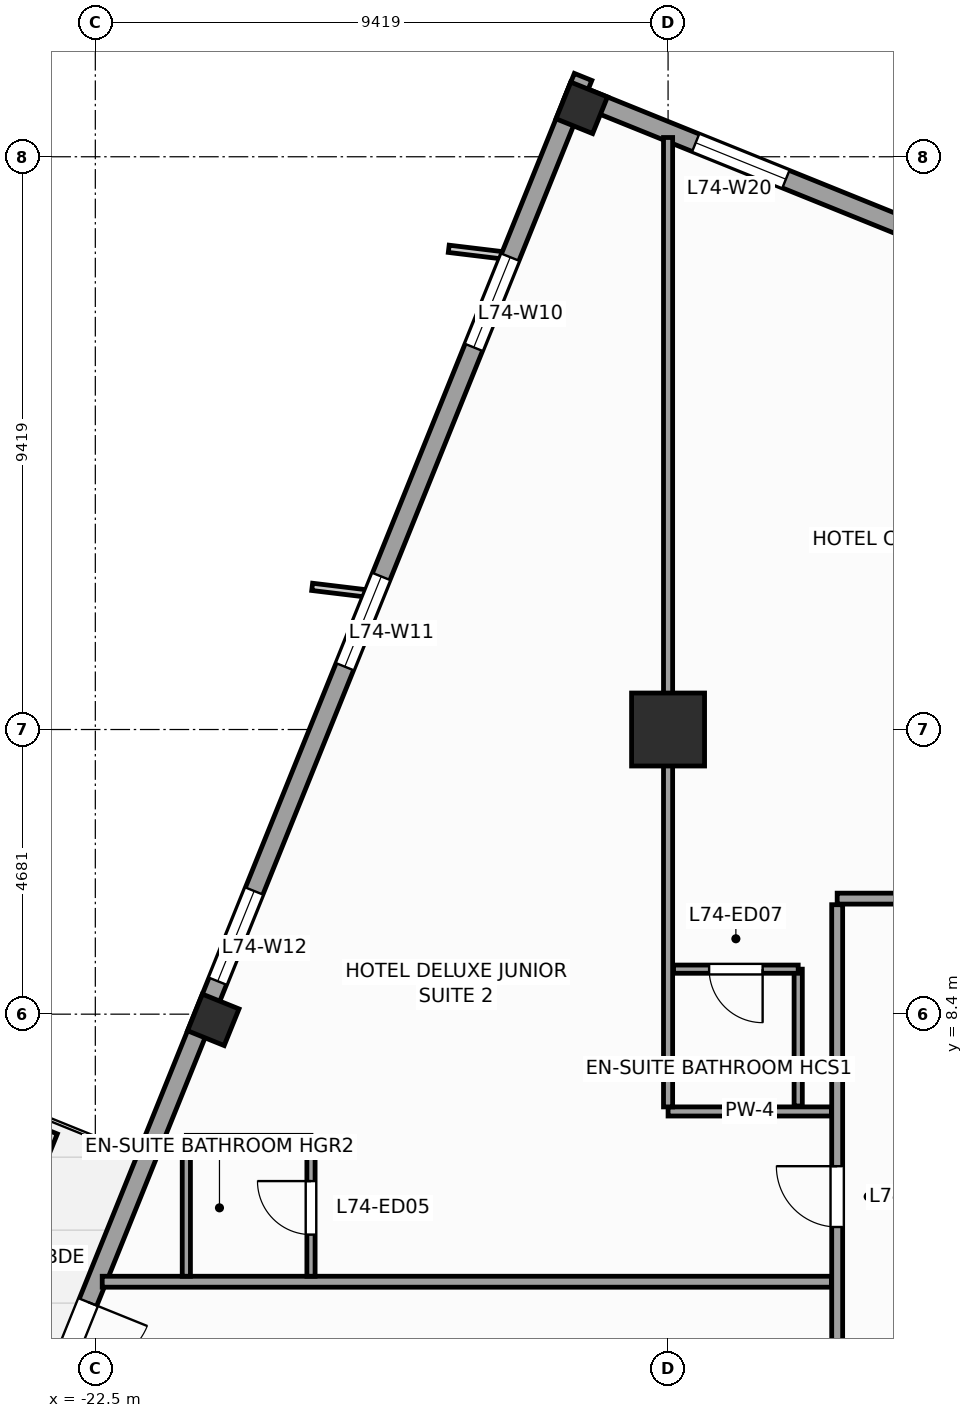
"""IFC4 building model, lengths in metres.
Left out: names, types, materials, properties, quantities, classifications, styles, units other than length and angle.
Written with IfcOpenShell. Run it as: python <this file> out.ifc"""

import sys

from ifc_helpers import new_model, si_unit, direction, frame, frame_2d, origin, origin_2d, place, context, subcontext, project, spatial, rectangle, extrude, source, transform, mapped, element, fill, save


model = new_model("IFC4")
c1 = context("Model", 3, precision=1e-05, world=origin(), true_north=direction((0.0, 1.0)))
c2 = subcontext(c1, "Body", "Model", "MODEL_VIEW")
j1 = project(units=[si_unit("LENGTHUNIT", "METRE"), si_unit("PLANEANGLEUNIT", "RADIAN")], contexts=[c1])
p1 = place(None, origin())
s1 = spatial("IfcSite", under=j1, at=p1, CompositionType="ELEMENT")
p2 = place(p1, origin())
s2 = spatial("IfcBuilding", under=s1, at=p2, CompositionType="ELEMENT")
p3 = place(p2, frame((0.0, 0.0, 301.2)))
s3 = spatial("IfcBuildingStorey", under=s2, at=p3, CompositionType="ELEMENT", Elevation=301.2)
m1 = source(origin(), c2, "Body", "SweptSolid", [
    extrude(rectangle(XDim=1.2, YDim=1.2, at=origin_2d()), origin(), (0.0, 0.0, 1.0), 3.6),
])
p4 = place(p3, frame((-13.081, 13.081, 0.0), z_axis=(0.0, 0.0, 1.0), x_axis=(1.0, 0.0, 0.0)))
e1 = element("IfcColumn", 1, at=p4, inside=s3, PredefinedType="COLUMN", context=c2, shape_type="MappedRepresentation", body=[
    mapped(m1, transform((0.0, 0.0, 0.0), scale=1.0)),
])
m2 = source(origin(), c2, "Body", "SweptSolid", [
    extrude(rectangle(XDim=0.65, YDim=0.65, at=origin_2d()), origin(), (0.0, 0.0, 1.0), 3.6),
])
for number, where, z_axis, x_axis in (
    (2, (-14.501, 23.304, 0.0), (0.0, 0.0, 1.0), (0.375, 0.927, 0.0)),
    (3, (-20.56, 8.307, 0.0), (0.0, 0.0, 1.0), (0.375, 0.927, 0.0)),
):
    element("IfcColumn", number, at=place(p3, frame(where, z_axis=z_axis, x_axis=x_axis)), inside=s3, PredefinedType="COLUMN", context=c2, shape_type="MappedRepresentation", body=[
        mapped(m2, transform((0.0, 0.0, 0.0), scale=1.0)),
    ])
p5 = place(p3, frame((-9.032, 21.278, 0.0), z_axis=(0.0, 0.0, 1.0), x_axis=(-0.927185411764, 0.374602739196, 0.0)))
e4 = element("IfcWall", 4, at=p5, inside=s3, PredefinedType="STANDARD", context=c2, shape_type="SweptSolid", body=[
    extrude(rectangle(XDim=6.155, YDim=0.31, at=frame_2d((3.078, 0.0))), origin(), (0.0, 0.0, 1.0), 3.35),
])
p6 = place(p5, frame((2.278, 0.0, 0.47)))
e5 = element("IfcOpeningElement", 5, at=p6, cuts=e4, PredefinedType="OPENING", context=c2, shape_type="SweptSolid", body=[
    extrude(rectangle(XDim=1.6, YDim=2.1, at=frame_2d((0.8, 1.05))), frame((0.0, 0.165, 0.0), z_axis=(0.0, -1.0, 0.0), x_axis=(1.0, 0.0, 0.0)), (0.0, 0.0, 1.0), 0.33),
])
p7 = place(p3, frame((-14.479, 23.813, 0.0), z_axis=(0.0, 0.0, 1.0), x_axis=(-0.374609557019, -0.927182657188, 0.0)))
e6 = element("IfcWall", 6, at=p7, inside=s3, PredefinedType="STANDARD", context=c2, shape_type="SweptSolid", body=[
    extrude(rectangle(XDim=33.31, YDim=0.31, at=frame_2d((16.655, 0.0))), origin(), (0.0, 0.0, 1.0), 2.75),
])
p8 = place(p7, frame((21.73, 0.0, 0.0)))
e7 = element("IfcOpeningElement", 7, at=p8, cuts=e6, PredefinedType="OPENING", context=c2, shape_type="SweptSolid", body=[
    extrude(rectangle(XDim=1.05, YDim=2.25, at=frame_2d((0.525, 1.125))), frame((0.0, 0.165, 0.0), z_axis=(0.0, -1.0, 0.0), x_axis=(1.0, 0.0, 0.0)), (0.0, 0.0, 1.0), 0.33),
])
p9 = place(p7, frame((3.197, 0.0, 0.47)))
e8 = element("IfcOpeningElement", 8, at=p9, cuts=e6, PredefinedType="OPENING", context=c2, shape_type="SweptSolid", body=[
    extrude(rectangle(XDim=1.6, YDim=2.1, at=frame_2d((0.8, 1.05))), frame((0.0, 0.165, 0.0), z_axis=(0.0, -1.0, 0.0), x_axis=(1.0, 0.0, 0.0)), (0.0, 0.0, 1.0), 0.33),
])
p10 = place(p7, frame((8.86, 0.0, 0.47)))
e9 = element("IfcOpeningElement", 9, at=p10, cuts=e6, PredefinedType="OPENING", context=c2, shape_type="SweptSolid", body=[
    extrude(rectangle(XDim=1.6, YDim=2.1, at=frame_2d((0.8, 1.05))), frame((0.0, 0.165, 0.0), z_axis=(0.0, -1.0, 0.0), x_axis=(1.0, 0.0, 0.0)), (0.0, 0.0, 1.0), 0.33),
])
p11 = place(p7, frame((14.439, 0.0, 0.47)))
e10 = element("IfcOpeningElement", 10, at=p11, cuts=e6, PredefinedType="OPENING", context=c2, shape_type="SweptSolid", body=[
    extrude(rectangle(XDim=1.6, YDim=2.1, at=frame_2d((0.8, 1.05))), frame((0.0, 0.165, 0.0), z_axis=(0.0, -1.0, 0.0), x_axis=(1.0, 0.0, 0.0)), (0.0, 0.0, 1.0), 0.33),
])
p12 = place(p7, frame((30.097, 0.0, 0.47)))
e11 = element("IfcOpeningElement", 11, at=p12, cuts=e6, PredefinedType="OPENING", context=c2, shape_type="SweptSolid", body=[
    extrude(rectangle(XDim=1.6, YDim=2.1, at=frame_2d((0.8, 1.05))), frame((0.0, 0.165, 0.0), z_axis=(0.0, -1.0, 0.0), x_axis=(1.0, 0.0, 0.0)), (0.0, 0.0, 1.0), 0.33),
])
p13 = place(p7, frame((27.374, 0.0, 0.47)))
e12 = element("IfcOpeningElement", 12, at=p13, cuts=e6, PredefinedType="OPENING", context=c2, shape_type="SweptSolid", body=[
    extrude(rectangle(XDim=1.6, YDim=2.1, at=frame_2d((0.8, 1.05))), frame((0.0, 0.165, 0.0), z_axis=(0.0, -1.0, 0.0), x_axis=(1.0, 0.0, 0.0)), (0.0, 0.0, 1.0), 0.33),
])
p14 = place(p3, frame((-10.3, 10.3, 0.0), z_axis=(0.0, 0.0, 1.0), x_axis=(1.0, 0.0, 0.0)))
e13 = element("IfcWall", 13, at=p14, inside=s3, PredefinedType="PARTITIONING", context=c2, shape_type="SweptSolid", body=[
    extrude(rectangle(XDim=21.65, YDim=0.18, at=frame_2d((10.825, 0.0))), origin(), (0.0, 0.0, 1.0), 3.35),
])
p15 = place(p14, frame((2.564, 0.0, 0.0)))
e14 = element("IfcOpeningElement", 14, at=p15, cuts=e13, PredefinedType="OPENING", context=c2, shape_type="SweptSolid", body=[
    extrude(rectangle(XDim=1.0, YDim=2.15, at=frame_2d((0.5, 1.075))), frame((0.0, 0.1, 0.0), z_axis=(0.0, -1.0, 0.0), x_axis=(1.0, 0.0, 0.0)), (0.0, 0.0, 1.0), 0.2),
])
p16 = place(p14, frame((8.05, 0.0, 0.0)))
e15 = element("IfcOpeningElement", 15, at=p16, cuts=e13, PredefinedType="OPENING", context=c2, shape_type="SweptSolid", body=[
    extrude(rectangle(XDim=1.0, YDim=2.15, at=frame_2d((0.5, 1.075))), frame((0.0, 0.1, 0.0), z_axis=(0.0, -1.0, 0.0), x_axis=(1.0, 0.0, 0.0)), (0.0, 0.0, 1.0), 0.2),
])
p17 = place(p14, frame((12.54, 0.0, 0.0)))
e16 = element("IfcOpeningElement", 16, at=p17, cuts=e13, PredefinedType="OPENING", context=c2, shape_type="SweptSolid", body=[
    extrude(rectangle(XDim=1.0, YDim=2.15, at=frame_2d((0.5, 1.075))), frame((0.0, 0.1, 0.0), z_axis=(0.0, -1.0, 0.0), x_axis=(1.0, 0.0, 0.0)), (0.0, 0.0, 1.0), 0.2),
])
p18 = place(p14, frame((18.871, 0.0, 0.0)))
e17 = element("IfcOpeningElement", 17, at=p18, cuts=e13, PredefinedType="OPENING", context=c2, shape_type="SweptSolid", body=[
    extrude(rectangle(XDim=1.0, YDim=2.15, at=frame_2d((0.5, 1.075))), frame((0.0, 0.1, 0.0), z_axis=(0.0, -1.0, 0.0), x_axis=(1.0, 0.0, 0.0)), (0.0, 0.0, 1.0), 0.2),
])
p19 = place(p3, frame((-10.3, -12.35, 0.0), z_axis=(0.0, 0.0, 1.0), x_axis=(0.0, 1.0, 0.0)))
e18 = element("IfcWall", 18, at=p19, inside=s3, PredefinedType="PARTITIONING", context=c2, shape_type="SweptSolid", body=[
    extrude(rectangle(XDim=22.55, YDim=0.18, at=frame_2d((11.275, 0.0))), origin(), (0.0, 0.0, 1.0), 3.35),
])
p20 = place(p19, frame((13.95, 0.0, 0.0)))
e19 = element("IfcOpeningElement", 19, at=p20, cuts=e18, PredefinedType="OPENING", context=c2, shape_type="SweptSolid", body=[
    extrude(rectangle(XDim=1.0, YDim=2.15, at=frame_2d((0.5, 1.075))), frame((0.0, 0.1, 0.0), z_axis=(0.0, -1.0, 0.0), x_axis=(1.0, 0.0, 0.0)), (0.0, 0.0, 1.0), 0.2),
])
p21 = place(p19, frame((17.25, 0.0, 0.0)))
e20 = element("IfcOpeningElement", 20, at=p21, cuts=e18, PredefinedType="OPENING", context=c2, shape_type="SweptSolid", body=[
    extrude(rectangle(XDim=1.0, YDim=2.15, at=frame_2d((0.5, 1.075))), frame((0.0, 0.1, 0.0), z_axis=(0.0, -1.0, 0.0), x_axis=(1.0, 0.0, 0.0)), (0.0, 0.0, 1.0), 0.2),
])
p22 = place(p19, frame((6.65, 0.0, 0.0)))
e21 = element("IfcOpeningElement", 21, at=p22, cuts=e18, PredefinedType="OPENING", context=c2, shape_type="SweptSolid", body=[
    extrude(rectangle(XDim=1.0, YDim=2.15, at=frame_2d((0.5, 1.075))), frame((0.0, 0.1, 0.0), z_axis=(0.0, -1.0, 0.0), x_axis=(1.0, 0.0, 0.0)), (0.0, 0.0, 1.0), 0.2),
])
p23 = place(p19, frame((10.15, 0.0, 0.0)))
e22 = element("IfcOpeningElement", 22, at=p23, cuts=e18, PredefinedType="OPENING", context=c2, shape_type="SweptSolid", body=[
    extrude(rectangle(XDim=1.0, YDim=2.15, at=frame_2d((0.5, 1.075))), frame((0.0, 0.1, 0.0), z_axis=(0.0, -1.0, 0.0), x_axis=(1.0, 0.0, 0.0)), (0.0, 0.0, 1.0), 0.2),
])
p24 = place(p3, frame((-10.395, 4.0, 0.0), z_axis=(0.0, 0.0, 1.0), x_axis=(-1.0, 0.0, 0.0)))
e23 = element("IfcWall", 23, at=p24, inside=s3, PredefinedType="PARTITIONING", context=c2, shape_type="SweptSolid", body=[
    extrude(rectangle(XDim=11.992, YDim=0.18, at=frame_2d((5.996, 0.0))), origin(), (0.0, 0.0, 1.0), 3.35),
])
p25 = place(p3, frame((-10.395, 6.8, 0.0), z_axis=(0.0, 0.0, 1.0), x_axis=(-1.0, 0.0, 0.0)))
e24 = element("IfcWall", 24, at=p25, inside=s3, PredefinedType="PARTITIONING", context=c2, shape_type="SweptSolid", body=[
    extrude(rectangle(XDim=2.686, YDim=0.15, at=frame_2d((1.343, 0.0))), origin(), (0.0, 0.0, 1.0), 3.35),
])
p26 = place(p3, frame((-13.081, 6.875, 0.0), z_axis=(0.0, 0.0, 1.0), x_axis=(0.0, 1.0, 0.0)))
e25 = element("IfcWall", 25, at=p26, inside=s3, PredefinedType="PARTITIONING", context=c2, shape_type="SweptSolid", body=[
    extrude(rectangle(XDim=15.942, YDim=0.15, at=frame_2d((7.971, 0.0))), origin(), (0.0, 0.0, 1.0), 2.45),
])
p27 = place(p3, frame((-18.953, 4.09, 0.0), z_axis=(0.0, 0.0, 1.0), x_axis=(0.0, 1.0, 0.0)))
e26 = element("IfcWall", 26, at=p27, inside=s3, PredefinedType="PARTITIONING", context=c2, shape_type="SweptSolid", body=[
    extrude(rectangle(XDim=2.25, YDim=0.135, at=frame_2d((1.125, 0.0))), origin(), (0.0, 0.0, 1.0), 3.35),
])
p28 = place(p27, frame((0.685, 0.0, 0.0)))
e27 = element("IfcOpeningElement", 27, at=p28, cuts=e26, PredefinedType="OPENING", context=c2, shape_type="SweptSolid", body=[
    extrude(rectangle(XDim=0.88, YDim=2.1, at=frame_2d((0.44, 1.05))), frame((0.0, 0.078, 0.0), z_axis=(0.0, -1.0, 0.0), x_axis=(1.0, 0.0, 0.0)), (0.0, 0.0, 1.0), 0.155),
])
p29 = place(p3, frame((-21.003, 6.34, 0.0), z_axis=(0.0, 0.0, 1.0), x_axis=(1.0, 0.0, 0.0)))
e28 = element("IfcWall", 28, at=p29, inside=s3, PredefinedType="PARTITIONING", context=c2, shape_type="SweptSolid", body=[
    extrude(rectangle(XDim=2.05, YDim=0.135, at=frame_2d((1.025, 0.0))), origin(), (0.0, 0.0, 1.0), 3.35),
])
for number, where, z_axis, x_axis in (
    (29, (-21.003, 4.09, 0.0), (0.0, 0.0, 1.0), (0.0, 1.0, 0.0)),
    (30, (-10.941, 6.89, 0.0), (0.0, 0.0, 1.0), (0.0, 1.0, 0.0)),
):
    element("IfcWall", number, at=place(p3, frame(where, z_axis=z_axis, x_axis=x_axis)), inside=s3, PredefinedType="PARTITIONING", context=c2, shape_type="SweptSolid", body=[
        extrude(rectangle(XDim=2.25, YDim=0.135, at=frame_2d((1.125, 0.0))), origin(), (0.0, 0.0, 1.0), 3.35),
    ])
p30 = place(p3, frame((-12.991, 9.14, 0.0), z_axis=(0.0, 0.0, 1.0), x_axis=(1.0, 0.0, 0.0)))
e31 = element("IfcWall", 31, at=p30, inside=s3, PredefinedType="PARTITIONING", context=c2, shape_type="SweptSolid", body=[
    extrude(rectangle(XDim=2.05, YDim=0.135, at=frame_2d((1.025, 0.0))), origin(), (0.0, 0.0, 1.0), 3.35),
])
p31 = place(p30, frame((0.585, 0.0, 0.0)))
e32 = element("IfcOpeningElement", 32, at=p31, cuts=e31, PredefinedType="OPENING", context=c2, shape_type="SweptSolid", body=[
    extrude(rectangle(XDim=0.88, YDim=2.1, at=frame_2d((0.44, 1.05))), frame((0.0, 0.078, 0.0), z_axis=(0.0, -1.0, 0.0), x_axis=(1.0, 0.0, 0.0)), (0.0, 0.0, 1.0), 0.155),
])
m3 = source(origin(), c2, "Body", "SweptSolid", [
    extrude(rectangle(XDim=1.05, YDim=2.25, at=frame_2d((0.525, 1.125))), frame((0.0, 0.025, 0.0), z_axis=(0.0, -1.0, 0.0), x_axis=(1.0, 0.0, 0.0)), (0.0, 0.0, 1.0), 0.05),
])
p32 = place(p8, origin())
e33 = element("IfcDoor", 33, at=p32, inside=s3, OperationType="SINGLE_SWING_LEFT", PredefinedType="DOOR", context=c2, shape_type="MappedRepresentation", body=[
    mapped(m3, transform((0.0, 0.0, 0.0), scale=1.0)),
])
fill(e7, e33)
m4 = source(origin(), c2, "Body", "SweptSolid", [
    extrude(rectangle(XDim=1.6, YDim=2.1, at=frame_2d((0.8, 1.05))), frame((0.0, 0.03, 0.0), z_axis=(0.0, -1.0, 0.0), x_axis=(1.0, 0.0, 0.0)), (0.0, 0.0, 1.0), 0.06),
])
p33 = place(p9, origin())
e34 = element("IfcWindow", 34, at=p33, inside=s3, PartitioningType="SINGLE_PANEL", PredefinedType="WINDOW", context=c2, shape_type="MappedRepresentation", body=[
    mapped(m4, transform((0.0, 0.0, 0.0), scale=1.0)),
])
fill(e8, e34)
p34 = place(p10, origin())
e35 = element("IfcWindow", 35, at=p34, inside=s3, PartitioningType="SINGLE_PANEL", PredefinedType="WINDOW", context=c2, shape_type="MappedRepresentation", body=[
    mapped(m4, transform((0.0, 0.0, 0.0), scale=1.0)),
])
fill(e9, e35)
p35 = place(p11, origin())
e36 = element("IfcWindow", 36, at=p35, inside=s3, PartitioningType="SINGLE_PANEL", PredefinedType="WINDOW", context=c2, shape_type="MappedRepresentation", body=[
    mapped(m4, transform((0.0, 0.0, 0.0), scale=1.0)),
])
fill(e10, e36)
p36 = place(p6, origin())
e37 = element("IfcWindow", 37, at=p36, inside=s3, PartitioningType="SINGLE_PANEL", PredefinedType="WINDOW", context=c2, shape_type="MappedRepresentation", body=[
    mapped(m4, transform((0.0, 0.0, 0.0), scale=1.0)),
])
fill(e5, e37)
m5 = source(origin(), c2, "Body", "SweptSolid", [
    extrude(rectangle(XDim=1.0, YDim=2.15, at=frame_2d((0.5, 1.075))), frame((0.0, 0.025, 0.0), z_axis=(0.0, -1.0, 0.0), x_axis=(1.0, 0.0, 0.0)), (0.0, 0.0, 1.0), 0.05),
])
p37 = place(p21, origin())
e38 = element("IfcDoor", 38, at=p37, inside=s3, OperationType="SINGLE_SWING_RIGHT", PredefinedType="DOOR", context=c2, shape_type="MappedRepresentation", body=[
    mapped(m5, transform((0.0, 0.0, 0.0), scale=1.0)),
])
fill(e20, e38)
m6 = source(origin(), c2, "Body", "SweptSolid", [
    extrude(rectangle(XDim=0.88, YDim=2.1, at=frame_2d((0.44, 1.05))), frame((0.0, 0.025, 0.0), z_axis=(0.0, -1.0, 0.0), x_axis=(1.0, 0.0, 0.0)), (0.0, 0.0, 1.0), 0.05),
])
p38 = place(p28, origin())
e39 = element("IfcDoor", 39, at=p38, inside=s3, OperationType="SINGLE_SWING_RIGHT", PredefinedType="DOOR", context=c2, shape_type="MappedRepresentation", body=[
    mapped(m6, transform((0.0, 0.0, 0.0), scale=1.0)),
])
fill(e27, e39)
p39 = place(p31, frame((0.88, 0.0, 0.0), z_axis=(0.0, 0.0, 1.0), x_axis=(-1.0, 0.0, 0.0)))
e40 = element("IfcDoor", 40, at=p39, inside=s3, OperationType="SINGLE_SWING_RIGHT", PredefinedType="DOOR", context=c2, shape_type="MappedRepresentation", body=[
    mapped(m6, transform((0.0, 0.0, 0.0), scale=1.0)),
])
fill(e32, e40)
save(model, sys.argv[1])
